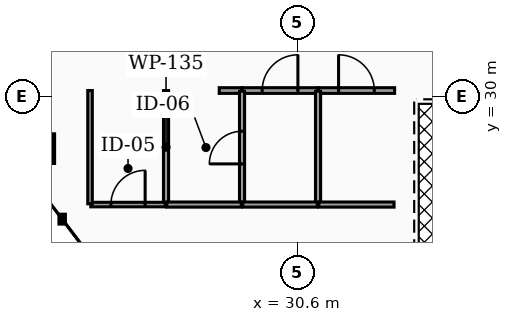
"""IFC4 building model, lengths in metres.
Left out: names, types, materials, properties, quantities, classifications, styles, units other than length and angle.
Written with IfcOpenShell. Run it as: python <this file> out.ifc"""

import sys

from ifc_helpers import new_model, si_unit, direction, frame, frame_2d, origin, origin_2d, place, context, subcontext, project, spatial, rectangle, hollow_rectangle, extrude, element, fill, save


model = new_model("IFC4")
c1 = context("Model", 3, precision=1e-05, world=origin(), true_north=direction((0.0, 1.0)))
c2 = subcontext(c1, "Body", "Model", "MODEL_VIEW")
j1 = project(units=[si_unit("LENGTHUNIT", "METRE"), si_unit("PLANEANGLEUNIT", "RADIAN")], contexts=[c1])
p1 = place(None, origin())
s1 = spatial("IfcSite", under=j1, at=p1, CompositionType="ELEMENT")
p2 = place(p1, origin())
s2 = spatial("IfcBuilding", under=s1, at=p2, CompositionType="ELEMENT")
p3 = place(p2, frame((0.0, 0.0, 190.74)))
s3 = spatial("IfcBuildingStorey", under=s2, at=p3, CompositionType="ELEMENT", Elevation=190.74)
p4 = place(p3, frame((23.827, 28.621, 0.0), z_axis=(0.048743981097, 0.063747651273, 0.996774930094), x_axis=(-0.79438322417, 0.607416902265, 0.0)))
e1 = element("IfcColumn", 1, at=p4, inside=s3, PredefinedType="COLUMN", context=c2, shape_type="SweptSolid", body=[
    extrude(hollow_rectangle(XDim=0.7, YDim=0.7, WallThickness=0.035, at=origin_2d()), origin(), (0.0, 0.0, 1.0), 3.401),
])
p5 = place(p3, frame((28.55, 30.15, 0.0), z_axis=(0.0, 0.0, 1.0), x_axis=(1.0, 0.0, 0.0)))
e2 = element("IfcWall", 2, at=p5, inside=s3, PredefinedType="PARTITIONING", context=c2, shape_type="SweptSolid", body=[
    extrude(rectangle(XDim=0.595, YDim=0.15, at=frame_2d((0.297, 0.0))), origin(), (0.0, 0.0, 1.0), 2.347),
])
p6 = place(p3, frame((29.155, 30.15, 0.0), z_axis=(0.0, 0.0, 1.0), x_axis=(1.0, 0.0, 0.0)))
e3 = element("IfcWall", 3, at=p6, inside=s3, PredefinedType="PARTITIONING", context=c2, shape_type="SweptSolid", body=[
    extrude(rectangle(XDim=1.99, YDim=0.15, at=frame_2d((0.995, 0.0))), origin(), (0.0, 0.0, 1.0), 2.347),
])
p7 = place(p6, frame((0.525, 0.0, 0.0)))
e4 = element("IfcOpeningElement", 4, at=p7, cuts=e3, PredefinedType="OPENING", context=c2, shape_type="SweptSolid", body=[
    extrude(rectangle(XDim=0.94, YDim=2.05, at=frame_2d((0.47, 1.025))), frame((0.0, 0.085, 0.0), z_axis=(0.0, -1.0, 0.0), x_axis=(1.0, 0.0, 0.0)), (0.0, 0.0, 1.0), 0.17),
])
p8 = place(p3, frame((31.155, 30.15, 0.0), z_axis=(0.0, 0.0, 1.0), x_axis=(1.0, 0.0, 0.0)))
e5 = element("IfcWall", 5, at=p8, inside=s3, PredefinedType="PARTITIONING", context=c2, shape_type="SweptSolid", body=[
    extrude(rectangle(XDim=2.01, YDim=0.15, at=frame_2d((1.005, 0.0))), origin(), (0.0, 0.0, 1.0), 2.347),
])
p9 = place(p8, frame((0.535, 0.0, 0.0)))
e6 = element("IfcOpeningElement", 6, at=p9, cuts=e5, PredefinedType="OPENING", context=c2, shape_type="SweptSolid", body=[
    extrude(rectangle(XDim=0.94, YDim=2.05, at=frame_2d((0.47, 1.025))), frame((0.0, 0.085, 0.0), z_axis=(0.0, -1.0, 0.0), x_axis=(1.0, 0.0, 0.0)), (0.0, 0.0, 1.0), 0.17),
])
p10 = place(p3, frame((27.15, 27.17, 0.0), z_axis=(0.0, 0.0, 1.0), x_axis=(0.0, 1.0, 0.0)))
e7 = element("IfcWall", 7, at=p10, inside=s3, PredefinedType="PARTITIONING", context=c2, shape_type="SweptSolid", body=[
    extrude(rectangle(XDim=2.98, YDim=0.135, at=frame_2d((1.49, 0.0))), origin(), (0.0, 0.0, 1.0), 2.347),
])
p11 = place(p3, frame((25.17, 27.15, 0.0), z_axis=(0.0, 0.0, 1.0), x_axis=(1.0, 0.0, 0.0)))
e8 = element("IfcWall", 8, at=p11, inside=s3, PredefinedType="PARTITIONING", context=c2, shape_type="SweptSolid", body=[
    extrude(rectangle(XDim=1.96, YDim=0.12, at=frame_2d((0.98, 0.0))), origin(), (0.0, 0.0, 1.0), 2.347),
])
p12 = place(p11, frame((0.53, 0.0, 0.0)))
e9 = element("IfcOpeningElement", 9, at=p12, cuts=e8, PredefinedType="OPENING", context=c2, shape_type="SweptSolid", body=[
    extrude(rectangle(XDim=0.9, YDim=2.05, at=frame_2d((0.45, 1.025))), frame((0.0, 0.07, 0.0), z_axis=(0.0, -1.0, 0.0), x_axis=(1.0, 0.0, 0.0)), (0.0, 0.0, 1.0), 0.14),
])
p13 = place(p3, frame((25.15, 27.17, 0.0), z_axis=(0.0, 0.0, 1.0), x_axis=(0.0, 1.0, 0.0)))
e10 = element("IfcWall", 10, at=p13, inside=s3, PredefinedType="PARTITIONING", context=c2, shape_type="SweptSolid", body=[
    extrude(rectangle(XDim=2.98, YDim=0.12, at=frame_2d((1.49, 0.0))), origin(), (0.0, 0.0, 1.0), 2.347),
])
p14 = place(p3, frame((29.15, 27.17, 0.0), z_axis=(0.0, 0.0, 1.0), x_axis=(0.0, 1.0, 0.0)))
e11 = element("IfcWall", 11, at=p14, inside=s3, PredefinedType="PARTITIONING", context=c2, shape_type="SweptSolid", body=[
    extrude(rectangle(XDim=2.96, YDim=0.135, at=frame_2d((1.48, 0.0))), origin(), (0.0, 0.0, 1.0), 2.347),
])
p15 = place(p14, frame((1.05, 0.0, 0.0)))
e12 = element("IfcOpeningElement", 12, at=p15, cuts=e11, PredefinedType="OPENING", context=c2, shape_type="SweptSolid", body=[
    extrude(rectangle(XDim=0.86, YDim=2.05, at=frame_2d((0.43, 1.025))), frame((0.0, 0.077, 0.0), z_axis=(0.0, -1.0, 0.0), x_axis=(1.0, 0.0, 0.0)), (0.0, 0.0, 1.0), 0.155),
])
p16 = place(p3, frame((27.17, 27.15, 0.0), z_axis=(0.0, 0.0, 1.0), x_axis=(1.0, 0.0, 0.0)))
e13 = element("IfcWall", 13, at=p16, inside=s3, PredefinedType="PARTITIONING", context=c2, shape_type="SweptSolid", body=[
    extrude(rectangle(XDim=1.96, YDim=0.135, at=frame_2d((0.98, 0.0))), origin(), (0.0, 0.0, 1.0), 2.347),
])
p17 = place(p3, frame((31.15, 27.17, 0.0), z_axis=(0.0, 0.0, 1.0), x_axis=(0.0, 1.0, 0.0)))
e14 = element("IfcWall", 14, at=p17, inside=s3, PredefinedType="PARTITIONING", context=c2, shape_type="SweptSolid", body=[
    extrude(rectangle(XDim=2.96, YDim=0.135, at=frame_2d((1.48, 0.0))), origin(), (0.0, 0.0, 1.0), 2.347),
])
p18 = place(p3, frame((29.17, 27.15, 0.0), z_axis=(0.0, 0.0, 1.0), x_axis=(1.0, 0.0, 0.0)))
e15 = element("IfcWall", 15, at=p18, inside=s3, PredefinedType="PARTITIONING", context=c2, shape_type="SweptSolid", body=[
    extrude(rectangle(XDim=1.96, YDim=0.135, at=frame_2d((0.98, 0.0))), origin(), (0.0, 0.0, 1.0), 2.347),
])
p19 = place(p3, frame((31.17, 27.15, 0.0), z_axis=(0.0, 0.0, 1.0), x_axis=(1.0, 0.0, 0.0)))
e16 = element("IfcWall", 16, at=p19, inside=s3, PredefinedType="PARTITIONING", context=c2, shape_type="SweptSolid", body=[
    extrude(rectangle(XDim=1.98, YDim=0.135, at=frame_2d((0.99, 0.0))), origin(), (0.0, 0.0, 1.0), 2.347),
])
p20 = place(p7, origin())
e17 = element("IfcDoor", 17, at=p20, inside=s3, OperationType="SINGLE_SWING_RIGHT", PredefinedType="DOOR", context=c2, shape_type="SweptSolid", body=[
    extrude(rectangle(XDim=0.94, YDim=2.05, at=frame_2d((0.47, 1.025))), frame((0.0, 0.025, 0.0), z_axis=(0.0, -1.0, 0.0), x_axis=(1.0, 0.0, 0.0)), (0.0, 0.0, 1.0), 0.05),
])
fill(e4, e17)
p21 = place(p9, origin())
e18 = element("IfcDoor", 18, at=p21, inside=s3, OperationType="SINGLE_SWING_LEFT", PredefinedType="DOOR", context=c2, shape_type="SweptSolid", body=[
    extrude(rectangle(XDim=0.94, YDim=2.05, at=frame_2d((0.47, 1.025))), frame((0.0, 0.025, 0.0), z_axis=(0.0, -1.0, 0.0), x_axis=(1.0, 0.0, 0.0)), (0.0, 0.0, 1.0), 0.05),
])
fill(e6, e18)
p22 = place(p12, origin())
e19 = element("IfcDoor", 19, at=p22, inside=s3, OperationType="SINGLE_SWING_RIGHT", PredefinedType="DOOR", context=c2, shape_type="SweptSolid", body=[
    extrude(rectangle(XDim=0.9, YDim=2.05, at=frame_2d((0.45, 1.025))), frame((0.0, 0.025, 0.0), z_axis=(0.0, -1.0, 0.0), x_axis=(1.0, 0.0, 0.0)), (0.0, 0.0, 1.0), 0.05),
])
fill(e9, e19)
p23 = place(p15, origin())
e20 = element("IfcDoor", 20, at=p23, inside=s3, OperationType="SINGLE_SWING_LEFT", PredefinedType="DOOR", context=c2, shape_type="SweptSolid", body=[
    extrude(rectangle(XDim=0.86, YDim=2.05, at=frame_2d((0.43, 1.025))), frame((0.0, 0.025, 0.0), z_axis=(0.0, -1.0, 0.0), x_axis=(1.0, 0.0, 0.0)), (0.0, 0.0, 1.0), 0.05),
])
fill(e12, e20)
save(model, sys.argv[1])
